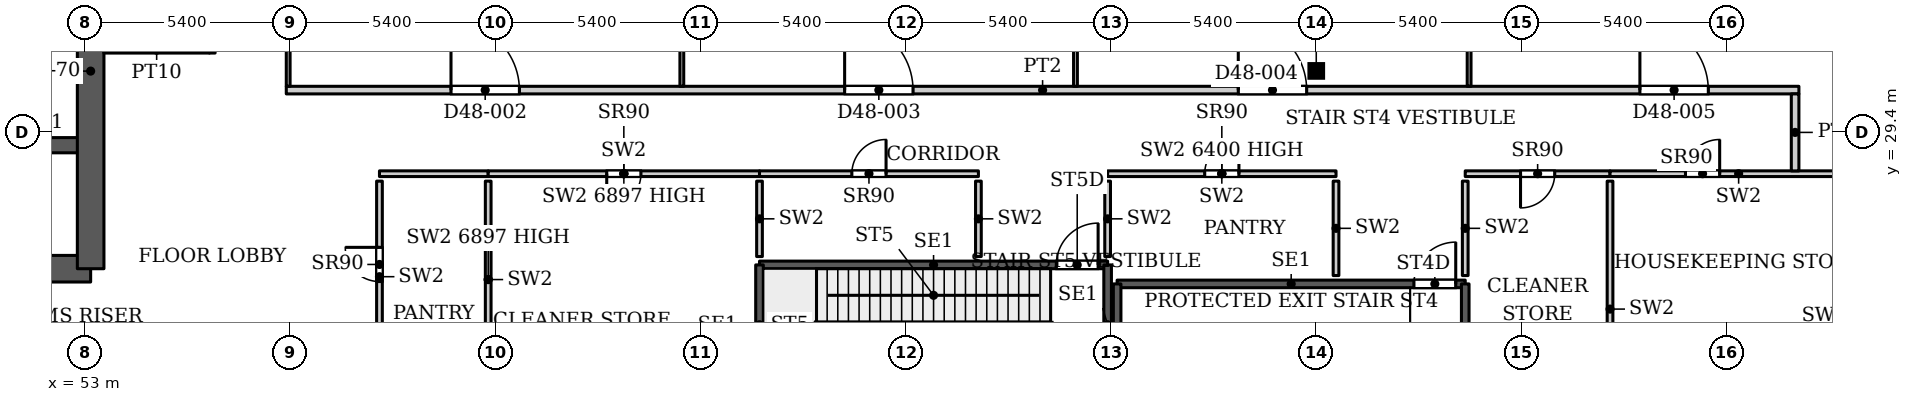
"""IFC4 building model, lengths in metres.
Left out: names, types, materials, properties, quantities, classifications, styles, units other than length and angle.
Written with IfcOpenShell. Run it as: python <this file> out.ifc"""

import sys

from ifc_helpers import new_model, si_unit, direction, frame, frame_2d, origin, origin_2d, place, context, subcontext, project, spatial, rectangle, hollow_rectangle, extrude, source, transform, mapped, element, fill, save


model = new_model("IFC4")
c1 = context("Model", 3, precision=1e-05, world=origin(), true_north=direction((0.0, 1.0)))
c2 = subcontext(c1, "Body", "Model", "MODEL_VIEW")
j1 = project(units=[si_unit("LENGTHUNIT", "METRE"), si_unit("PLANEANGLEUNIT", "RADIAN")], contexts=[c1])
p1 = place(None, origin())
s1 = spatial("IfcSite", under=j1, at=p1, CompositionType="ELEMENT")
p2 = place(p1, origin())
s2 = spatial("IfcBuilding", under=s1, at=p2, CompositionType="ELEMENT")
p3 = place(p2, frame((0.0, 0.0, 203.3)))
s3 = spatial("IfcBuildingStorey", under=s2, at=p3, CompositionType="ELEMENT", Elevation=203.3)
p4 = place(p3, frame((85.4, 31.005, 0.0), z_axis=(0.0, 0.0, 1.0), x_axis=(1.0, 0.0, 0.0)))
e1 = element("IfcColumn", 1, at=p4, inside=s3, PredefinedType="COLUMN", context=c2, shape_type="SweptSolid", body=[
    extrude(hollow_rectangle(XDim=0.305, YDim=0.305, WallThickness=0.016, InnerFilletRadius=0.016, OuterFilletRadius=0.032, at=origin_2d()), origin(), (0.0, 0.0, 1.0), 7.8),
])
p5 = place(p3, frame((34.75, 25.8, 0.0), z_axis=(0.0, 0.0, 1.0), x_axis=(1.0, 0.0, 0.0)))
e2 = element("IfcWall", 2, at=p5, inside=s3, PredefinedType="SHEAR", context=c2, shape_type="SweptSolid", body=[
    extrude(rectangle(XDim=18.4, YDim=0.7, at=frame_2d((9.2, 0.0))), origin(), (0.0, 0.0, 1.0), 7.8),
])
p6 = place(p3, frame((34.75, 29.05, 0.0), z_axis=(0.0, 0.0, 1.0), x_axis=(1.0, 0.0, 0.0)))
e3 = element("IfcWall", 3, at=p6, inside=s3, PredefinedType="SHEAR", context=c2, shape_type="SweptSolid", body=[
    extrude(rectangle(XDim=18.4, YDim=0.4, at=frame_2d((9.2, 0.0))), origin(), (0.0, 0.0, 1.0), 7.8),
])
p7 = place(p6, frame((0.875, 0.0, 0.0)))
e4 = element("IfcOpeningElement", 4, at=p7, cuts=e3, PredefinedType="OPENING", context=c2, shape_type="SweptSolid", body=[
    extrude(rectangle(XDim=1.1, YDim=2.2, at=frame_2d((0.55, 1.1))), frame((0.0, 0.21, 0.0), z_axis=(0.0, -1.0, 0.0), x_axis=(1.0, 0.0, 0.0)), (0.0, 0.0, 1.0), 0.42),
])
p8 = place(p6, frame((3.725, 0.0, 0.0)))
e5 = element("IfcOpeningElement", 5, at=p8, cuts=e3, PredefinedType="OPENING", context=c2, shape_type="SweptSolid", body=[
    extrude(rectangle(XDim=1.1, YDim=2.2, at=frame_2d((0.55, 1.1))), frame((0.0, 0.21, 0.0), z_axis=(0.0, -1.0, 0.0), x_axis=(1.0, 0.0, 0.0)), (0.0, 0.0, 1.0), 0.42),
])
p9 = place(p6, frame((6.575, 0.0, 0.0)))
e6 = element("IfcOpeningElement", 6, at=p9, cuts=e3, PredefinedType="OPENING", context=c2, shape_type="SweptSolid", body=[
    extrude(rectangle(XDim=1.1, YDim=2.2, at=frame_2d((0.55, 1.1))), frame((0.0, 0.21, 0.0), z_axis=(0.0, -1.0, 0.0), x_axis=(1.0, 0.0, 0.0)), (0.0, 0.0, 1.0), 0.42),
])
p10 = place(p6, frame((9.425, 0.0, 0.0)))
e7 = element("IfcOpeningElement", 7, at=p10, cuts=e3, PredefinedType="OPENING", context=c2, shape_type="SweptSolid", body=[
    extrude(rectangle(XDim=1.1, YDim=2.2, at=frame_2d((0.55, 1.1))), frame((0.0, 0.21, 0.0), z_axis=(0.0, -1.0, 0.0), x_axis=(1.0, 0.0, 0.0)), (0.0, 0.0, 1.0), 0.42),
])
p11 = place(p6, frame((12.275, 0.0, 0.0)))
e8 = element("IfcOpeningElement", 8, at=p11, cuts=e3, PredefinedType="OPENING", context=c2, shape_type="SweptSolid", body=[
    extrude(rectangle(XDim=1.1, YDim=2.2, at=frame_2d((0.55, 1.1))), frame((0.0, 0.21, 0.0), z_axis=(0.0, -1.0, 0.0), x_axis=(1.0, 0.0, 0.0)), (0.0, 0.0, 1.0), 0.42),
])
p12 = place(p6, frame((15.125, 0.0, 0.0)))
e9 = element("IfcOpeningElement", 9, at=p12, cuts=e3, PredefinedType="OPENING", context=c2, shape_type="SweptSolid", body=[
    extrude(rectangle(XDim=1.1, YDim=2.2, at=frame_2d((0.55, 1.1))), frame((0.0, 0.21, 0.0), z_axis=(0.0, -1.0, 0.0), x_axis=(1.0, 0.0, 0.0)), (0.0, 0.0, 1.0), 0.42),
])
p13 = place(p3, frame((53.15, 25.8, 0.0), z_axis=(0.0, 0.0, 1.0), x_axis=(0.0, 1.0, 0.0)))
e10 = element("IfcWall", 10, at=p13, inside=s3, PredefinedType="SHEAR", context=c2, shape_type="SweptSolid", body=[
    extrude(rectangle(XDim=10.4, YDim=0.7, at=frame_2d((5.2, 0.0))), origin(), (0.0, 0.0, 1.0), 7.8),
])
p14 = place(p13, frame((6.65, 0.0, 0.0)))
e11 = element("IfcOpeningElement", 11, at=p14, cuts=e10, PredefinedType="OPENING", context=c2, shape_type="SweptSolid", body=[
    extrude(rectangle(XDim=1.8, YDim=2.1, at=frame_2d((0.9, 1.05))), frame((0.0, 0.36, 0.0), z_axis=(0.0, -1.0, 0.0), x_axis=(1.0, 0.0, 0.0)), (0.0, 0.0, 1.0), 0.72),
])
p15 = place(p3, frame((80.16, 25.4, 0.0), z_axis=(0.0, 0.0, 1.0), x_axis=(1.0, 0.0, 0.0)))
e12 = element("IfcWall", 12, at=p15, inside=s3, PredefinedType="SHEAR", context=c2, shape_type="SweptSolid", body=[
    extrude(rectangle(XDim=9.16, YDim=0.2, at=frame_2d((4.58, 0.0))), origin(), (0.0, 0.0, 1.0), 7.8),
])
p16 = place(p15, frame((7.81, 0.0, 0.0)))
e13 = element("IfcOpeningElement", 13, at=p16, cuts=e12, PredefinedType="OPENING", context=c2, shape_type="SweptSolid", body=[
    extrude(rectangle(XDim=1.1, YDim=2.2, at=frame_2d((0.55, 1.1))), frame((0.0, 0.11, 0.0), z_axis=(0.0, -1.0, 0.0), x_axis=(1.0, 0.0, 0.0)), (0.0, 0.0, 1.0), 0.22),
])
for number, where, z_axis, x_axis in (
    (14, (80.16, 22.25, 0.0), (0.0, 0.0, 1.0), (0.0, 1.0, 0.0)),
    (15, (89.32, 22.25, 0.0), (0.0, 0.0, 1.0), (0.0, 1.0, 0.0)),
):
    element("IfcWall", number, at=place(p3, frame(where, z_axis=z_axis, x_axis=x_axis)), inside=s3, PredefinedType="SHEAR", context=c2, shape_type="SweptSolid", body=[
        extrude(rectangle(XDim=3.15, YDim=0.2, at=frame_2d((1.575, 0.0))), origin(), (0.0, 0.0, 1.0), 7.8),
    ])
p17 = place(p3, frame((70.75, 25.9, 0.0), z_axis=(0.0, 0.0, 1.0), x_axis=(1.0, 0.0, 0.0)))
e16 = element("IfcWall", 16, at=p17, inside=s3, PredefinedType="SHEAR", context=c2, shape_type="SweptSolid", body=[
    extrude(rectangle(XDim=9.16, YDim=0.2, at=frame_2d((4.58, 0.0))), origin(), (0.0, 0.0, 1.0), 7.8),
])
p18 = place(p17, frame((7.81, 0.0, 0.0)))
e17 = element("IfcOpeningElement", 17, at=p18, cuts=e16, PredefinedType="OPENING", context=c2, shape_type="SweptSolid", body=[
    extrude(rectangle(XDim=1.1, YDim=2.2, at=frame_2d((0.55, 1.1))), frame((0.0, 0.11, 0.0), z_axis=(0.0, -1.0, 0.0), x_axis=(1.0, 0.0, 0.0)), (0.0, 0.0, 1.0), 0.22),
])
for number, where, z_axis, x_axis in (
    (18, (70.75, 22.75, 0.0), (0.0, 0.0, 1.0), (0.0, 1.0, 0.0)),
    (19, (79.91, 22.75, 0.0), (0.0, 0.0, 1.0), (0.0, 1.0, 0.0)),
):
    element("IfcWall", number, at=place(p3, frame(where, z_axis=z_axis, x_axis=x_axis)), inside=s3, PredefinedType="SHEAR", context=c2, shape_type="SweptSolid", body=[
        extrude(rectangle(XDim=3.15, YDim=0.2, at=frame_2d((1.575, 0.0))), origin(), (0.0, 0.0, 1.0), 7.8),
    ])
p19 = place(p3, frame((60.75, 28.3, 0.0), z_axis=(0.0, 0.0, 1.0), x_axis=(1.0, 0.0, 0.0)))
e20 = element("IfcWall", 20, at=p19, inside=s3, PredefinedType="PARTITIONING", context=c2, shape_type="SweptSolid", body=[
    extrude(rectangle(XDim=2.861, YDim=0.15, at=frame_2d((1.431, 0.0))), origin(), (0.0, 0.0, 1.0), 7.8),
])
p20 = place(p3, frame((60.75, 23.075, 0.0), z_axis=(0.0, 0.0, 1.0), x_axis=(0.0, 1.0, 0.0)))
e21 = element("IfcWall", 21, at=p20, inside=s3, PredefinedType="PARTITIONING", context=c2, shape_type="SweptSolid", body=[
    extrude(rectangle(XDim=5.03, YDim=0.15, at=frame_2d((2.515, 0.0))), origin(), (0.0, 0.0, 1.0), 7.8),
])
p21 = place(p20, frame((2.387, 0.0, 0.0)))
e22 = element("IfcOpeningElement", 22, at=p21, cuts=e21, PredefinedType="OPENING", context=c2, shape_type="SweptSolid", body=[
    extrude(rectangle(XDim=0.9, YDim=2.2, at=frame_2d((0.45, 1.1))), frame((0.0, 0.085, 0.0), z_axis=(0.0, -1.0, 0.0), x_axis=(1.0, 0.0, 0.0)), (0.0, 0.0, 1.0), 0.17),
])
p22 = place(p3, frame((63.611, 22.924, 0.0), z_axis=(0.0, 0.0, 1.0), x_axis=(0.0, 1.0, 0.0)))
e23 = element("IfcWall", 23, at=p22, inside=s3, PredefinedType="PARTITIONING", context=c2, shape_type="SweptSolid", body=[
    extrude(rectangle(XDim=5.181, YDim=0.15, at=frame_2d((2.59, 0.0))), origin(), (0.0, 0.0, 1.0), 6.897),
])
p23 = place(p3, frame((63.611, 28.3, 0.0), z_axis=(0.0, 0.0, 1.0), x_axis=(1.0, 0.0, 0.0)))
e24 = element("IfcWall", 24, at=p23, inside=s3, PredefinedType="PARTITIONING", context=c2, shape_type="SweptSolid", body=[
    extrude(rectangle(XDim=7.139, YDim=0.15, at=frame_2d((3.569, 0.0))), origin(), (0.0, 0.0, 1.0), 6.897),
])
p24 = place(p23, frame((3.119, 0.0, 0.0)))
e25 = element("IfcOpeningElement", 25, at=p24, cuts=e24, PredefinedType="OPENING", context=c2, shape_type="SweptSolid", body=[
    extrude(rectangle(XDim=0.9, YDim=2.2, at=frame_2d((0.45, 1.1))), frame((0.0, 0.085, 0.0), z_axis=(0.0, -1.0, 0.0), x_axis=(1.0, 0.0, 0.0)), (0.0, 0.0, 1.0), 0.17),
])
p25 = place(p3, frame((70.75, 26.12, 0.0), z_axis=(0.0, 0.0, 1.0), x_axis=(0.0, 1.0, 0.0)))
e26 = element("IfcWall", 26, at=p25, inside=s3, PredefinedType="PARTITIONING", context=c2, shape_type="SweptSolid", body=[
    extrude(rectangle(XDim=1.985, YDim=0.15, at=frame_2d((0.992, 0.0))), origin(), (0.0, 0.0, 1.0), 7.8),
])
p26 = place(p3, frame((70.75, 28.3, 0.0), z_axis=(0.0, 0.0, 1.0), x_axis=(1.0, 0.0, 0.0)))
e27 = element("IfcWall", 27, at=p26, inside=s3, PredefinedType="PARTITIONING", context=c2, shape_type="SweptSolid", body=[
    extrude(rectangle(XDim=5.76, YDim=0.15, at=frame_2d((2.88, 0.0))), origin(), (0.0, 0.0, 1.0), 7.8),
])
p27 = place(p26, frame((2.43, 0.0, 0.0)))
e28 = element("IfcOpeningElement", 28, at=p27, cuts=e27, PredefinedType="OPENING", context=c2, shape_type="SweptSolid", body=[
    extrude(rectangle(XDim=0.9, YDim=2.2, at=frame_2d((0.45, 1.1))), frame((0.0, 0.085, 0.0), z_axis=(0.0, -1.0, 0.0), x_axis=(1.0, 0.0, 0.0)), (0.0, 0.0, 1.0), 0.17),
])
p28 = place(p3, frame((76.51, 26.12, 0.0), z_axis=(0.0, 0.0, 1.0), x_axis=(0.0, 1.0, 0.0)))
e29 = element("IfcWall", 29, at=p28, inside=s3, PredefinedType="PARTITIONING", context=c2, shape_type="SweptSolid", body=[
    extrude(rectangle(XDim=1.985, YDim=0.15, at=frame_2d((0.992, 0.0))), origin(), (0.0, 0.0, 1.0), 7.8),
])
p29 = place(p3, frame((79.91, 28.3, 0.0), z_axis=(0.0, 0.0, 1.0), x_axis=(1.0, 0.0, 0.0)))
e30 = element("IfcWall", 30, at=p29, inside=s3, PredefinedType="PARTITIONING", context=c2, shape_type="SweptSolid", body=[
    extrude(rectangle(XDim=6.01, YDim=0.15, at=frame_2d((3.005, 0.0))), origin(), (0.0, 0.0, 1.0), 6.4),
])
p30 = place(p29, frame((2.555, 0.0, 0.0)))
e31 = element("IfcOpeningElement", 31, at=p30, cuts=e30, PredefinedType="OPENING", context=c2, shape_type="SweptSolid", body=[
    extrude(rectangle(XDim=0.9, YDim=2.2, at=frame_2d((0.45, 1.1))), frame((0.0, 0.085, 0.0), z_axis=(0.0, -1.0, 0.0), x_axis=(1.0, 0.0, 0.0)), (0.0, 0.0, 1.0), 0.17),
])
p31 = place(p3, frame((79.91, 26.12, 0.0), z_axis=(0.0, 0.0, 1.0), x_axis=(0.0, 1.0, 0.0)))
e32 = element("IfcWall", 32, at=p31, inside=s3, PredefinedType="PARTITIONING", context=c2, shape_type="SweptSolid", body=[
    extrude(rectangle(XDim=1.985, YDim=0.15, at=frame_2d((0.992, 0.0))), origin(), (0.0, 0.0, 1.0), 7.8),
])
p32 = place(p3, frame((85.92, 25.62, 0.0), z_axis=(0.0, 0.0, 1.0), x_axis=(0.0, 1.0, 0.0)))
e33 = element("IfcWall", 33, at=p32, inside=s3, PredefinedType="PARTITIONING", context=c2, shape_type="SweptSolid", body=[
    extrude(rectangle(XDim=2.485, YDim=0.15, at=frame_2d((1.242, 0.0))), origin(), (0.0, 0.0, 1.0), 7.8),
])
p33 = place(p3, frame((89.32, 28.3, 0.0), z_axis=(0.0, 0.0, 1.0), x_axis=(1.0, 0.0, 0.0)))
e34 = element("IfcWall", 34, at=p33, inside=s3, PredefinedType="PARTITIONING", context=c2, shape_type="SweptSolid", body=[
    extrude(rectangle(XDim=3.81, YDim=0.15, at=frame_2d((1.905, 0.0))), origin(), (0.0, 0.0, 1.0), 7.8),
])
p34 = place(p33, frame((1.455, 0.0, 0.0)))
e35 = element("IfcOpeningElement", 35, at=p34, cuts=e34, PredefinedType="OPENING", context=c2, shape_type="SweptSolid", body=[
    extrude(rectangle(XDim=0.9, YDim=2.2, at=frame_2d((0.45, 1.1))), frame((0.0, 0.085, 0.0), z_axis=(0.0, -1.0, 0.0), x_axis=(1.0, 0.0, 0.0)), (0.0, 0.0, 1.0), 0.17),
])
p35 = place(p3, frame((89.32, 25.62, 0.0), z_axis=(0.0, 0.0, 1.0), x_axis=(0.0, 1.0, 0.0)))
e36 = element("IfcWall", 36, at=p35, inside=s3, PredefinedType="PARTITIONING", context=c2, shape_type="SweptSolid", body=[
    extrude(rectangle(XDim=2.485, YDim=0.15, at=frame_2d((1.242, 0.0))), origin(), (0.0, 0.0, 1.0), 7.8),
])
p36 = place(p3, frame((93.13, 21.37, 0.0), z_axis=(0.0, 0.0, 1.0), x_axis=(0.0, 1.0, 0.0)))
e37 = element("IfcWall", 37, at=p36, inside=s3, PredefinedType="PARTITIONING", context=c2, shape_type="SweptSolid", body=[
    extrude(rectangle(XDim=6.735, YDim=0.15, at=frame_2d((3.367, 0.0))), origin(), (0.0, 0.0, 1.0), 7.8),
])
p37 = place(p3, frame((93.13, 28.3, 0.0), z_axis=(0.0, 0.0, 1.0), x_axis=(1.0, 0.0, 0.0)))
e38 = element("IfcWall", 38, at=p37, inside=s3, PredefinedType="PARTITIONING", context=c2, shape_type="SweptSolid", body=[
    extrude(rectangle(XDim=6.768, YDim=0.15, at=frame_2d((3.384, 0.0))), origin(), (0.0, 0.0, 1.0), 7.8),
])
p38 = place(p37, frame((1.985, 0.0, 0.0)))
e39 = element("IfcOpeningElement", 39, at=p38, cuts=e38, PredefinedType="OPENING", context=c2, shape_type="SweptSolid", body=[
    extrude(rectangle(XDim=0.9, YDim=2.2, at=frame_2d((0.45, 1.1))), frame((0.0, 0.085, 0.0), z_axis=(0.0, -1.0, 0.0), x_axis=(1.0, 0.0, 0.0)), (0.0, 0.0, 1.0), 0.17),
])
p39 = place(p3, frame((53.499, 31.55, 0.0), z_axis=(0.0, 0.0, 1.0), x_axis=(1.0, 0.0, 0.0)))
e40 = element("IfcWall", 40, at=p39, inside=s3, PredefinedType="PARTITIONING", context=c2, shape_type="SweptSolid", body=[
    extrude(rectangle(XDim=2.776, YDim=0.15, at=frame_2d((1.388, 0.0))), origin(), (0.0, 0.0, 1.0), 7.5),
])
p40 = place(p3, frame((56.35, 31.475, 0.0), z_axis=(0.0, 0.0, 1.0), x_axis=(0.0, 1.0, 0.0)))
e41 = element("IfcWall", 41, at=p40, inside=s3, PredefinedType="PARTITIONING", context=c2, shape_type="SweptSolid", body=[
    extrude(rectangle(XDim=3.75, YDim=0.15, at=frame_2d((1.875, 0.0))), origin(), (0.0, 0.0, 1.0), 7.5),
])
p41 = place(p3, frame((58.298, 30.5, 0.0), z_axis=(0.0, 0.0, 1.0), x_axis=(1.0, 0.0, 0.0)))
e42 = element("IfcWall", 42, at=p41, inside=s3, PredefinedType="PARTITIONING", context=c2, shape_type="SweptSolid", body=[
    extrude(rectangle(XDim=39.802, YDim=0.2, at=frame_2d((19.901, 0.0))), origin(), (0.0, 0.0, 1.0), 7.5),
])
p42 = place(p41, frame((4.334, 0.0, 0.0)))
e43 = element("IfcOpeningElement", 43, at=p42, cuts=e42, PredefinedType="OPENING", context=c2, shape_type="SweptSolid", body=[
    extrude(rectangle(XDim=1.8, YDim=2.1, at=frame_2d((0.9, 1.05))), frame((0.0, 0.11, 0.0), z_axis=(0.0, -1.0, 0.0), x_axis=(1.0, 0.0, 0.0)), (0.0, 0.0, 1.0), 0.22),
])
p43 = place(p41, frame((14.692, 0.0, 0.0)))
e44 = element("IfcOpeningElement", 44, at=p43, cuts=e42, PredefinedType="OPENING", context=c2, shape_type="SweptSolid", body=[
    extrude(rectangle(XDim=1.8, YDim=2.1, at=frame_2d((0.9, 1.05))), frame((0.0, 0.11, 0.0), z_axis=(0.0, -1.0, 0.0), x_axis=(1.0, 0.0, 0.0)), (0.0, 0.0, 1.0), 0.22),
])
p44 = place(p41, frame((25.05, 0.0, 0.0)))
e45 = element("IfcOpeningElement", 45, at=p44, cuts=e42, PredefinedType="OPENING", context=c2, shape_type="SweptSolid", body=[
    extrude(rectangle(XDim=1.8, YDim=2.1, at=frame_2d((0.9, 1.05))), frame((0.0, 0.11, 0.0), z_axis=(0.0, -1.0, 0.0), x_axis=(1.0, 0.0, 0.0)), (0.0, 0.0, 1.0), 0.22),
])
p45 = place(p41, frame((35.618, 0.0, 0.0)))
e46 = element("IfcOpeningElement", 46, at=p45, cuts=e42, PredefinedType="OPENING", context=c2, shape_type="SweptSolid", body=[
    extrude(rectangle(XDim=1.8, YDim=2.1, at=frame_2d((0.9, 1.05))), frame((0.0, 0.11, 0.0), z_axis=(0.0, -1.0, 0.0), x_axis=(1.0, 0.0, 0.0)), (0.0, 0.0, 1.0), 0.22),
])
p46 = place(p3, frame((58.348, 30.6, 0.0), z_axis=(0.0, 0.0, 1.0), x_axis=(0.0, 1.0, 0.0)))
e47 = element("IfcWall", 47, at=p46, inside=s3, PredefinedType="PARTITIONING", context=c2, shape_type="SweptSolid", body=[
    extrude(rectangle(XDim=13.37, YDim=0.1, at=frame_2d((6.685, 0.0))), origin(), (0.0, 0.0, 1.0), 6.897),
])
for number, where, z_axis, x_axis in (
    (48, (68.706, 30.6, 0.0), (0.0, 0.0, 1.0), (0.0, 1.0, 0.0)),
    (49, (79.064, 30.6, 0.0), (0.0, 0.0, 1.0), (0.0, 1.0, 0.0)),
    (50, (89.422, 30.6, 0.0), (0.0, 0.0, 1.0), (0.0, 1.0, 0.0)),
):
    element("IfcWall", number, at=place(p3, frame(where, z_axis=z_axis, x_axis=x_axis)), inside=s3, PredefinedType="PARTITIONING", context=c2, shape_type="SweptSolid", body=[
        extrude(rectangle(XDim=13.37, YDim=0.1, at=frame_2d((6.685, 0.0))), origin(), (0.0, 0.0, 1.0), 7.5),
    ])
p47 = place(p3, frame((98.0, 28.374, 0.0), z_axis=(0.0, 0.0, 1.0), x_axis=(0.0, 1.0, 0.0)))
e51 = element("IfcWall", 51, at=p47, inside=s3, PredefinedType="PARTITIONING", context=c2, shape_type="SweptSolid", body=[
    extrude(rectangle(XDim=2.026, YDim=0.2, at=frame_2d((1.013, 0.0))), origin(), (0.0, 0.0, 1.0), 7.5),
])
m1 = source(origin(), c2, "Body", "SweptSolid", [
    extrude(rectangle(XDim=0.9, YDim=2.2, at=frame_2d((0.45, 1.1))), frame((0.0, 0.025, 0.0), z_axis=(0.0, -1.0, 0.0), x_axis=(1.0, 0.0, 0.0)), (0.0, 0.0, 1.0), 0.05),
])
p48 = place(p21, origin())
e52 = element("IfcDoor", 52, at=p48, inside=s3, OperationType="SINGLE_SWING_LEFT", PredefinedType="DOOR", context=c2, shape_type="MappedRepresentation", body=[
    mapped(m1, transform((0.0, 0.0, 0.0), x_axis=(1.0, 0.0, 0.0), y_axis=(0.0, 1.0, 0.0), z_axis=(0.0, 0.0, 1.0), scale=1.0)),
])
fill(e22, e52)
p49 = place(p24, origin())
e53 = element("IfcDoor", 53, at=p49, inside=s3, OperationType="SINGLE_SWING_RIGHT", PredefinedType="DOOR", context=c2, shape_type="MappedRepresentation", body=[
    mapped(m1, transform((0.0, 0.0, 0.0), x_axis=(1.0, 0.0, 0.0), y_axis=(0.0, 1.0, 0.0), z_axis=(0.0, 0.0, 1.0), scale=1.0)),
])
fill(e25, e53)
p50 = place(p27, origin())
e54 = element("IfcDoor", 54, at=p50, inside=s3, OperationType="SINGLE_SWING_LEFT", PredefinedType="DOOR", context=c2, shape_type="MappedRepresentation", body=[
    mapped(m1, transform((0.0, 0.0, 0.0), x_axis=(1.0, 0.0, 0.0), y_axis=(0.0, 1.0, 0.0), z_axis=(0.0, 0.0, 1.0), scale=1.0)),
])
fill(e28, e54)
p51 = place(p30, origin())
e55 = element("IfcDoor", 55, at=p51, inside=s3, OperationType="SINGLE_SWING_LEFT", PredefinedType="DOOR", context=c2, shape_type="MappedRepresentation", body=[
    mapped(m1, transform((0.0, 0.0, 0.0), x_axis=(1.0, 0.0, 0.0), y_axis=(0.0, 1.0, 0.0), z_axis=(0.0, 0.0, 1.0), scale=1.0)),
])
fill(e31, e55)
p52 = place(p34, origin())
e56 = element("IfcDoor", 56, at=p52, inside=s3, OperationType="SINGLE_SWING_RIGHT", PredefinedType="DOOR", context=c2, shape_type="MappedRepresentation", body=[
    mapped(m1, transform((0.0, 0.0, 0.0), x_axis=(1.0, 0.0, 0.0), y_axis=(0.0, 1.0, 0.0), z_axis=(0.0, 0.0, 1.0), scale=1.0)),
])
fill(e35, e56)
p53 = place(p38, origin())
e57 = element("IfcDoor", 57, at=p53, inside=s3, OperationType="SINGLE_SWING_LEFT", PredefinedType="DOOR", context=c2, shape_type="MappedRepresentation", body=[
    mapped(m1, transform((0.0, 0.0, 0.0), x_axis=(1.0, 0.0, 0.0), y_axis=(0.0, 1.0, 0.0), z_axis=(0.0, 0.0, 1.0), scale=1.0)),
])
fill(e39, e57)
m2 = source(origin(), c2, "Body", "SweptSolid", [
    extrude(rectangle(XDim=1.1, YDim=2.2, at=frame_2d((0.55, 1.1))), frame((0.0, 0.025, 0.0), z_axis=(0.0, -1.0, 0.0), x_axis=(1.0, 0.0, 0.0)), (0.0, 0.0, 1.0), 0.05),
])
p54 = place(p16, origin())
e58 = element("IfcDoor", 58, at=p54, inside=s3, OperationType="SINGLE_SWING_LEFT", PredefinedType="DOOR", context=c2, shape_type="MappedRepresentation", body=[
    mapped(m2, transform((0.0, 0.0, 0.0), x_axis=(1.0, 0.0, 0.0), y_axis=(0.0, 1.0, 0.0), z_axis=(0.0, 0.0, 1.0), scale=1.0)),
])
fill(e13, e58)
p55 = place(p18, origin())
e59 = element("IfcDoor", 59, at=p55, inside=s3, OperationType="SINGLE_SWING_LEFT", PredefinedType="DOOR", context=c2, shape_type="MappedRepresentation", body=[
    mapped(m2, transform((0.0, 0.0, 0.0), x_axis=(1.0, 0.0, 0.0), y_axis=(0.0, 1.0, 0.0), z_axis=(0.0, 0.0, 1.0), scale=1.0)),
])
fill(e17, e59)
m3 = source(origin(), c2, "Body", "SweptSolid", [
    extrude(rectangle(XDim=1.8, YDim=2.1, at=frame_2d((0.9, 1.05))), frame((0.0, 0.025, 0.0), z_axis=(0.0, -1.0, 0.0), x_axis=(1.0, 0.0, 0.0)), (0.0, 0.0, 1.0), 0.05),
])
p56 = place(p42, origin())
e60 = element("IfcDoor", 60, at=p56, inside=s3, OperationType="DOUBLE_DOOR_SINGLE_SWING", PredefinedType="DOOR", context=c2, shape_type="MappedRepresentation", body=[
    mapped(m3, transform((0.0, 0.0, 0.0), x_axis=(1.0, 0.0, 0.0), y_axis=(0.0, 1.0, 0.0), z_axis=(0.0, 0.0, 1.0), scale=1.0)),
])
fill(e43, e60)
p57 = place(p43, origin())
e61 = element("IfcDoor", 61, at=p57, inside=s3, OperationType="DOUBLE_DOOR_SINGLE_SWING", PredefinedType="DOOR", context=c2, shape_type="MappedRepresentation", body=[
    mapped(m3, transform((0.0, 0.0, 0.0), x_axis=(1.0, 0.0, 0.0), y_axis=(0.0, 1.0, 0.0), z_axis=(0.0, 0.0, 1.0), scale=1.0)),
])
fill(e44, e61)
p58 = place(p44, origin())
e62 = element("IfcDoor", 62, at=p58, inside=s3, OperationType="DOUBLE_DOOR_SINGLE_SWING", PredefinedType="DOOR", context=c2, shape_type="MappedRepresentation", body=[
    mapped(m3, transform((0.0, 0.0, 0.0), x_axis=(1.0, 0.0, 0.0), y_axis=(0.0, 1.0, 0.0), z_axis=(0.0, 0.0, 1.0), scale=1.0)),
])
fill(e45, e62)
p59 = place(p45, origin())
e63 = element("IfcDoor", 63, at=p59, inside=s3, OperationType="DOUBLE_DOOR_SINGLE_SWING", PredefinedType="DOOR", context=c2, shape_type="MappedRepresentation", body=[
    mapped(m3, transform((0.0, 0.0, 0.0), x_axis=(1.0, 0.0, 0.0), y_axis=(0.0, 1.0, 0.0), z_axis=(0.0, 0.0, 1.0), scale=1.0)),
])
fill(e46, e63)
save(model, sys.argv[1])
